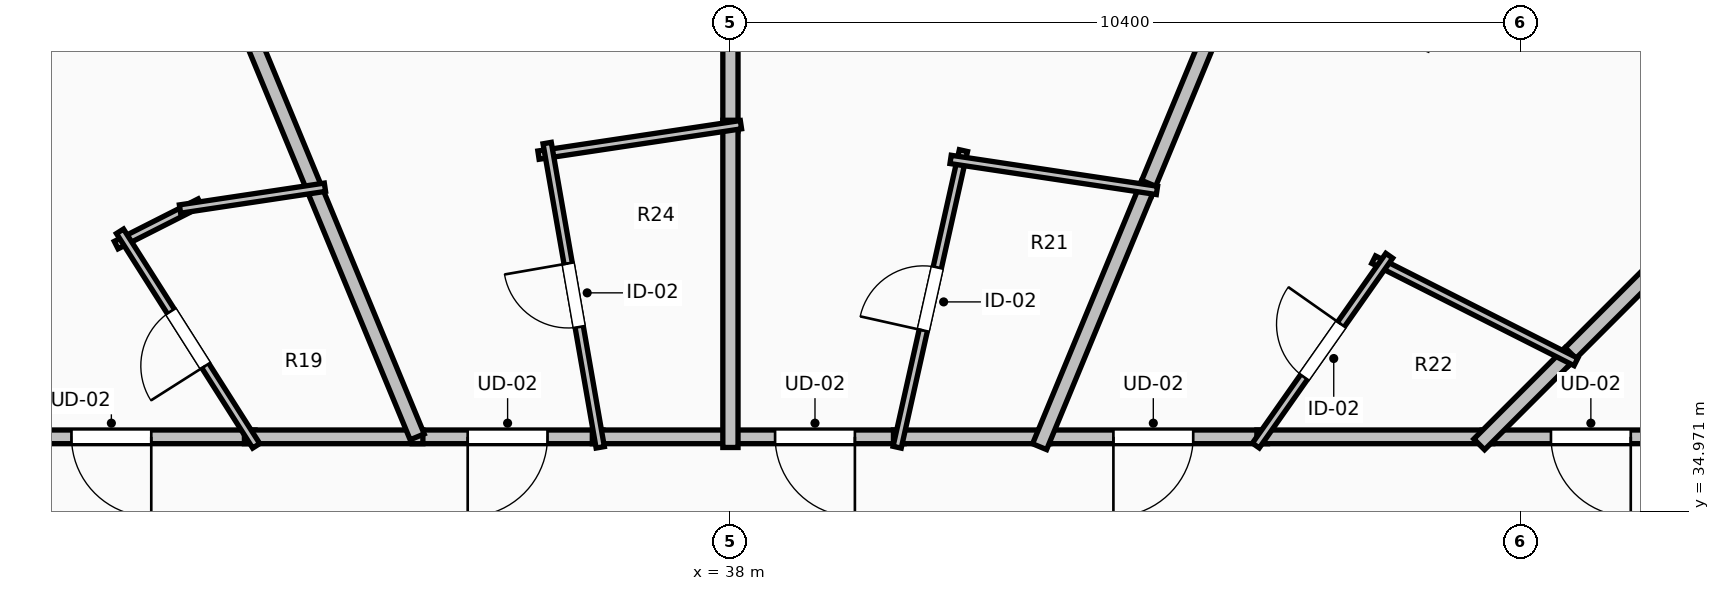
"""IFC4 building model, lengths in metres.
Left out: names, types, materials, properties, quantities, classifications, styles, units other than length and angle.
Written with IfcOpenShell. Run it as: python <this file> out.ifc"""

import sys

from ifc_helpers import new_model, si_unit, direction, frame, frame_2d, origin, place, context, subcontext, project, spatial, rectangle, extrude, element, fill, save


model = new_model("IFC4")
c1 = context("Model", 3, precision=1e-05, world=origin(), true_north=direction((0.0, 1.0)))
c2 = subcontext(c1, "Body", "Model", "MODEL_VIEW")
j1 = project(units=[si_unit("LENGTHUNIT", "METRE"), si_unit("PLANEANGLEUNIT", "RADIAN")], contexts=[c1])
p1 = place(None, origin())
s1 = spatial("IfcSite", under=j1, at=p1, CompositionType="ELEMENT")
p2 = place(p1, origin())
s2 = spatial("IfcBuilding", under=s1, at=p2, CompositionType="ELEMENT")
p3 = place(p2, frame((0.0, 0.0, 27.5)))
s3 = spatial("IfcBuildingStorey", under=s2, at=p3, CompositionType="ELEMENT", Elevation=27.5)
p4 = place(p3, frame((50.75, 35.95, 0.0), z_axis=(0.0, 0.0, 1.0), x_axis=(-1.0, 0.0, 0.0)))
e1 = element("IfcWall", 1, at=p4, inside=s3, PredefinedType="PARTITIONING", context=c2, shape_type="SweptSolid", body=[
    extrude(rectangle(XDim=2.86, YDim=0.18, at=frame_2d((1.43, 0.0))), origin(), (0.0, 0.0, 1.0), 2.432),
])
p5 = place(p4, frame((0.905, 0.0, 0.0)))
e2 = element("IfcOpeningElement", 2, at=p5, cuts=e1, PredefinedType="OPENING", context=c2, shape_type="SweptSolid", body=[
    extrude(rectangle(XDim=1.05, YDim=2.2, at=frame_2d((0.525, 1.1))), frame((0.0, 0.105, 0.0), z_axis=(0.0, -1.0, 0.0), x_axis=(1.0, 0.0, 0.0)), (0.0, 0.0, 1.0), 0.21),
])
p6 = place(p3, frame((45.066, 35.95, 0.0), z_axis=(0.0, 0.0, 1.0), x_axis=(-1.0, 0.0, 0.0)))
e3 = element("IfcWall", 3, at=p6, inside=s3, PredefinedType="PARTITIONING", context=c2, shape_type="SweptSolid", body=[
    extrude(rectangle(XDim=3.005, YDim=0.18, at=frame_2d((1.502, 0.0))), origin(), (0.0, 0.0, 1.0), 3.24),
])
p7 = place(p6, frame((0.978, 0.0, 0.0)))
e4 = element("IfcOpeningElement", 4, at=p7, cuts=e3, PredefinedType="OPENING", context=c2, shape_type="SweptSolid", body=[
    extrude(rectangle(XDim=1.05, YDim=2.2, at=frame_2d((0.525, 1.1))), frame((0.0, 0.105, 0.0), z_axis=(0.0, -1.0, 0.0), x_axis=(1.0, 0.0, 0.0)), (0.0, 0.0, 1.0), 0.21),
])
p8 = place(p3, frame((48.03, 35.95, 0.0), z_axis=(0.0, 0.0, 1.0), x_axis=(-1.0, 0.0, 0.0)))
e5 = element("IfcWall", 5, at=p8, inside=s3, PredefinedType="PARTITIONING", context=c2, shape_type="SweptSolid", body=[
    extrude(rectangle(XDim=3.104, YDim=0.18, at=frame_2d((1.552, 0.0))), origin(), (0.0, 0.0, 1.0), 2.432),
])
p9 = place(p3, frame((40.285, 35.95, 0.0), z_axis=(0.0, 0.0, 1.0), x_axis=(-1.0, 0.0, 0.0)))
e6 = element("IfcWall", 6, at=p9, inside=s3, PredefinedType="PARTITIONING", context=c2, shape_type="SweptSolid", body=[
    extrude(rectangle(XDim=2.345, YDim=0.18, at=frame_2d((1.172, 0.0))), origin(), (0.0, 0.0, 1.0), 3.24),
])
p10 = place(p9, frame((0.647, 0.0, 0.0)))
e7 = element("IfcOpeningElement", 7, at=p10, cuts=e6, PredefinedType="OPENING", context=c2, shape_type="SweptSolid", body=[
    extrude(rectangle(XDim=1.05, YDim=2.2, at=frame_2d((0.525, 1.1))), frame((0.0, 0.105, 0.0), z_axis=(0.0, -1.0, 0.0), x_axis=(1.0, 0.0, 0.0)), (0.0, 0.0, 1.0), 0.21),
])
p11 = place(p3, frame((42.201, 35.95, 0.0), z_axis=(0.0, 0.0, 1.0), x_axis=(-1.0, 0.0, 0.0)))
e8 = element("IfcWall", 8, at=p11, inside=s3, PredefinedType="PARTITIONING", context=c2, shape_type="SweptSolid", body=[
    extrude(rectangle(XDim=2.056, YDim=0.18, at=frame_2d((1.028, 0.0))), origin(), (0.0, 0.0, 1.0), 3.24),
])
p12 = place(p3, frame((36.323, 35.95, 0.0), z_axis=(0.0, 0.0, 1.0), x_axis=(-1.0, 0.0, 0.0)))
e9 = element("IfcWall", 9, at=p12, inside=s3, PredefinedType="PARTITIONING", context=c2, shape_type="SweptSolid", body=[
    extrude(rectangle(XDim=2.509, YDim=0.18, at=frame_2d((1.254, 0.0))), origin(), (0.0, 0.0, 1.0), 3.24),
])
p13 = place(p12, frame((0.729, 0.0, 0.0)))
e10 = element("IfcOpeningElement", 10, at=p13, cuts=e9, PredefinedType="OPENING", context=c2, shape_type="SweptSolid", body=[
    extrude(rectangle(XDim=1.05, YDim=2.2, at=frame_2d((0.525, 1.1))), frame((0.0, 0.105, 0.0), z_axis=(0.0, -1.0, 0.0), x_axis=(1.0, 0.0, 0.0)), (0.0, 0.0, 1.0), 0.21),
])
p14 = place(p3, frame((38.08, 35.95, 0.0), z_axis=(0.0, 0.0, 1.0), x_axis=(-1.0, 0.0, 0.0)))
e11 = element("IfcWall", 11, at=p14, inside=s3, PredefinedType="PARTITIONING", context=c2, shape_type="SweptSolid", body=[
    extrude(rectangle(XDim=1.897, YDim=0.18, at=frame_2d((0.948, 0.0))), origin(), (0.0, 0.0, 1.0), 3.24),
])
p15 = place(p3, frame((31.746, 35.95, 0.0), z_axis=(0.0, 0.0, 1.0), x_axis=(-1.0, 0.0, 0.0)))
e12 = element("IfcWall", 12, at=p15, inside=s3, PredefinedType="PARTITIONING", context=c2, shape_type="SweptSolid", body=[
    extrude(rectangle(XDim=3.781, YDim=0.18, at=frame_2d((1.891, 0.0))), origin(), (0.0, 0.0, 1.0), 2.432),
])
p16 = place(p15, frame((1.365, 0.0, 0.0)))
e13 = element("IfcOpeningElement", 13, at=p16, cuts=e12, PredefinedType="OPENING", context=c2, shape_type="SweptSolid", body=[
    extrude(rectangle(XDim=1.05, YDim=2.2, at=frame_2d((0.525, 1.1))), frame((0.0, 0.105, 0.0), z_axis=(0.0, -1.0, 0.0), x_axis=(1.0, 0.0, 0.0)), (0.0, 0.0, 1.0), 0.21),
])
p17 = place(p3, frame((33.954, 35.95, 0.0), z_axis=(0.0, 0.0, 1.0), x_axis=(-1.0, 0.0, 0.0)))
e14 = element("IfcWall", 14, at=p17, inside=s3, PredefinedType="PARTITIONING", context=c2, shape_type="SweptSolid", body=[
    extrude(rectangle(XDim=2.348, YDim=0.18, at=frame_2d((1.174, 0.0))), origin(), (0.0, 0.0, 1.0), 3.24),
])
p18 = place(p3, frame((55.753, 43.753, 0.0), z_axis=(0.0, 0.0, 1.0), x_axis=(-0.707106781187, -0.707106781187, 0.0)))
e15 = element("IfcWall", 15, at=p18, inside=s3, PredefinedType="PARTITIONING", context=c2, shape_type="SweptSolid", body=[
    extrude(rectangle(XDim=9.615, YDim=0.2, at=frame_2d((4.808, 0.0))), origin(), (0.0, 0.0, 1.0), 2.624),
])
p19 = place(p3, frame((49.053, 37.053, 0.0), z_axis=(0.0, 0.0, 1.0), x_axis=(-0.707106781187, -0.707106781187, 0.0)))
e16 = element("IfcWall", 16, at=p19, inside=s3, PredefinedType="PARTITIONING", context=c2, shape_type="SweptSolid", body=[
    extrude(rectangle(XDim=1.7, YDim=0.2, at=frame_2d((0.85, 0.0))), origin(), (0.0, 0.0, 1.0), 2.432),
])
p20 = place(p3, frame((46.462, 38.281, 0.0), z_axis=(0.0, 0.0, 1.0), x_axis=(0.892486842203, -0.451073426944, 0.0)))
e17 = element("IfcWall", 17, at=p20, inside=s3, PredefinedType="PARTITIONING", context=c2, shape_type="SweptSolid", body=[
    extrude(rectangle(XDim=2.982, YDim=0.11, at=frame_2d((1.491, 0.0))), origin(), (0.0, 0.0, 1.0), 2.432),
])
p21 = place(p3, frame((44.913, 35.835, 0.0), z_axis=(0.0, 0.0, 1.0), x_axis=(0.574986040322, 0.818163219312, 0.0)))
e18 = element("IfcWall", 18, at=p21, inside=s3, PredefinedType="PARTITIONING", context=c2, shape_type="SweptSolid", body=[
    extrude(rectangle(XDim=3.052, YDim=0.11, at=frame_2d((1.526, 0.0))), origin(), (0.0, 0.0, 1.0), 2.922),
])
p22 = place(p21, frame((1.101, 0.0, 0.0)))
e19 = element("IfcOpeningElement", 19, at=p22, cuts=e18, PredefinedType="OPENING", context=c2, shape_type="SweptSolid", body=[
    extrude(rectangle(XDim=0.85, YDim=2.1, at=frame_2d((0.425, 1.05))), frame((0.0, 0.07, 0.0), z_axis=(0.0, -1.0, 0.0), x_axis=(1.0, 0.0, 0.0)), (0.0, 0.0, 1.0), 0.14),
])
p23 = place(p3, frame((46.792, 47.225, 0.0), z_axis=(0.0, 0.0, 1.0), x_axis=(-0.382750893248, -0.923851586413, 0.0)))
e20 = element("IfcWall", 20, at=p23, inside=s3, PredefinedType="PARTITIONING", context=c2, shape_type="SweptSolid", body=[
    extrude(rectangle(XDim=8.734, YDim=0.2, at=frame_2d((4.367, 0.0))), origin(), (0.0, 0.0, 1.0), 2.874),
])
p24 = place(p3, frame((43.503, 39.285, 0.0), z_axis=(0.0, 0.0, 1.0), x_axis=(-0.382867331148, -0.923803337697, 0.0)))
e21 = element("IfcWall", 21, at=p24, inside=s3, PredefinedType="PARTITIONING", context=c2, shape_type="SweptSolid", body=[
    extrude(rectangle(XDim=3.75, YDim=0.2, at=frame_2d((1.875, 0.0))), origin(), (0.0, 0.0, 1.0), 2.922),
])
p25 = place(p3, frame((40.194, 35.813, 0.0), z_axis=(0.0, 0.0, 1.0), x_axis=(0.21804880916, 0.975937865248, 0.0)))
e22 = element("IfcWall", 22, at=p25, inside=s3, PredefinedType="PARTITIONING", context=c2, shape_type="SweptSolid", body=[
    extrude(rectangle(XDim=3.998, YDim=0.11, at=frame_2d((1.999, 0.0))), origin(), (0.0, 0.0, 1.0), 2.922),
])
p26 = place(p25, frame((1.574, 0.0, 0.0)))
e23 = element("IfcOpeningElement", 23, at=p26, cuts=e22, PredefinedType="OPENING", context=c2, shape_type="SweptSolid", body=[
    extrude(rectangle(XDim=0.85, YDim=2.1, at=frame_2d((0.425, 1.05))), frame((0.0, 0.07, 0.0), z_axis=(0.0, -1.0, 0.0), x_axis=(1.0, 0.0, 0.0)), (0.0, 0.0, 1.0), 0.14),
])
p27 = place(p3, frame((40.896, 39.6, 0.0), z_axis=(0.0, 0.0, 1.0), x_axis=(0.98891024541, -0.148514398367, 0.0)))
e24 = element("IfcWall", 24, at=p27, inside=s3, PredefinedType="PARTITIONING", context=c2, shape_type="SweptSolid", body=[
    extrude(rectangle(XDim=2.745, YDim=0.11, at=frame_2d((1.373, 0.0))), origin(), (0.0, 0.0, 1.0), 3.24),
])
p28 = place(p3, frame((38.0, 48.35, 0.0), z_axis=(0.0, 0.0, 1.0), x_axis=(0.0, -1.0, 0.0)))
e25 = element("IfcWall", 25, at=p28, inside=s3, PredefinedType="PARTITIONING", context=c2, shape_type="SweptSolid", body=[
    extrude(rectangle(XDim=8.375, YDim=0.2, at=frame_2d((4.188, 0.0))), origin(), (0.0, 0.0, 1.0), 2.432),
])
p29 = place(p3, frame((38.0, 40.115, 0.0), z_axis=(0.0, 0.0, 1.0), x_axis=(0.0, -1.0, 0.0)))
e26 = element("IfcWall", 26, at=p29, inside=s3, PredefinedType="PARTITIONING", context=c2, shape_type="SweptSolid", body=[
    extrude(rectangle(XDim=4.305, YDim=0.2, at=frame_2d((2.152, 0.0))), origin(), (0.0, 0.0, 1.0), 2.922),
])
p30 = place(p3, frame((35.475, 39.656, 0.0), z_axis=(0.0, 0.0, 1.0), x_axis=(0.988878442063, 0.148726012595, 0.0)))
e27 = element("IfcWall", 27, at=p30, inside=s3, PredefinedType="PARTITIONING", context=c2, shape_type="SweptSolid", body=[
    extrude(rectangle(XDim=2.694, YDim=0.11, at=frame_2d((1.347, 0.0))), origin(), (0.0, 0.0, 1.0), 3.24),
])
p31 = place(p3, frame((36.287, 35.812, 0.0), z_axis=(0.0, 0.0, 1.0), x_axis=(-0.171838135253, 0.985125197766, 0.0)))
e28 = element("IfcWall", 28, at=p31, inside=s3, PredefinedType="PARTITIONING", context=c2, shape_type="SweptSolid", body=[
    extrude(rectangle(XDim=4.063, YDim=0.11, at=frame_2d((2.032, 0.0))), origin(), (0.0, 0.0, 1.0), 2.922),
])
p32 = place(p31, frame((1.607, 0.0, 0.0)))
e29 = element("IfcOpeningElement", 29, at=p32, cuts=e28, PredefinedType="OPENING", context=c2, shape_type="SweptSolid", body=[
    extrude(rectangle(XDim=0.85, YDim=2.1, at=frame_2d((0.425, 1.05))), frame((0.0, 0.07, 0.0), z_axis=(0.0, -1.0, 0.0), x_axis=(1.0, 0.0, 0.0)), (0.0, 0.0, 1.0), 0.14),
])
p33 = place(p3, frame((29.208, 47.225, 0.0), z_axis=(0.0, 0.0, 1.0), x_axis=(0.382723985517, -0.923862733803, 0.0)))
e30 = element("IfcWall", 30, at=p33, inside=s3, PredefinedType="PARTITIONING", context=c2, shape_type="SweptSolid", body=[
    extrude(rectangle(XDim=12.204, YDim=0.2, at=frame_2d((6.102, 0.0))), origin(), (0.0, 0.0, 1.0), 2.432),
])
p34 = place(p3, frame((29.919, 38.473, 0.0), z_axis=(0.0, 0.0, 1.0), x_axis=(0.892084606746, 0.45186840386, 0.0)))
e31 = element("IfcWall", 31, at=p34, inside=s3, PredefinedType="PARTITIONING", context=c2, shape_type="SweptSolid", body=[
    extrude(rectangle(XDim=1.236, YDim=0.11, at=frame_2d((0.618, 0.0))), origin(), (0.0, 0.0, 1.0), 3.24),
])
p35 = place(p3, frame((30.759, 38.947, 0.0), z_axis=(0.0, 0.0, 1.0), x_axis=(0.988889867338, 0.148650026153, 0.0)))
e32 = element("IfcWall", 32, at=p35, inside=s3, PredefinedType="PARTITIONING", context=c2, shape_type="SweptSolid", body=[
    extrude(rectangle(XDim=1.928, YDim=0.11, at=frame_2d((0.964, 0.0))), origin(), (0.0, 0.0, 1.0), 3.24),
])
p36 = place(p3, frame((31.761, 35.832, 0.0), z_axis=(0.0, 0.0, 1.0), x_axis=(-0.535991614842, 0.844223305067, 0.0)))
e33 = element("IfcWall", 33, at=p36, inside=s3, PredefinedType="PARTITIONING", context=c2, shape_type="SweptSolid", body=[
    extrude(rectangle(XDim=3.343, YDim=0.11, at=frame_2d((1.672, 0.0))), origin(), (0.0, 0.0, 1.0), 2.432),
])
p37 = place(p36, frame((1.247, 0.0, 0.0)))
e34 = element("IfcOpeningElement", 34, at=p37, cuts=e33, PredefinedType="OPENING", context=c2, shape_type="SweptSolid", body=[
    extrude(rectangle(XDim=0.85, YDim=2.1, at=frame_2d((0.425, 1.05))), frame((0.0, 0.07, 0.0), z_axis=(0.0, -1.0, 0.0), x_axis=(1.0, 0.0, 0.0)), (0.0, 0.0, 1.0), 0.14),
])
p38 = place(p5, origin())
e35 = element("IfcDoor", 35, at=p38, inside=s3, OperationType="SINGLE_SWING_LEFT", PredefinedType="DOOR", context=c2, shape_type="SweptSolid", body=[
    extrude(rectangle(XDim=1.05, YDim=2.2, at=frame_2d((0.525, 1.1))), frame((0.0, 0.025, 0.0), z_axis=(0.0, -1.0, 0.0), x_axis=(1.0, 0.0, 0.0)), (0.0, 0.0, 1.0), 0.05),
])
fill(e2, e35)
p39 = place(p7, origin())
e36 = element("IfcDoor", 36, at=p39, inside=s3, OperationType="SINGLE_SWING_RIGHT", PredefinedType="DOOR", context=c2, shape_type="SweptSolid", body=[
    extrude(rectangle(XDim=1.05, YDim=2.2, at=frame_2d((0.525, 1.1))), frame((0.0, 0.025, 0.0), z_axis=(0.0, -1.0, 0.0), x_axis=(1.0, 0.0, 0.0)), (0.0, 0.0, 1.0), 0.05),
])
fill(e4, e36)
p40 = place(p10, origin())
e37 = element("IfcDoor", 37, at=p40, inside=s3, OperationType="SINGLE_SWING_LEFT", PredefinedType="DOOR", context=c2, shape_type="SweptSolid", body=[
    extrude(rectangle(XDim=1.05, YDim=2.2, at=frame_2d((0.525, 1.1))), frame((0.0, 0.025, 0.0), z_axis=(0.0, -1.0, 0.0), x_axis=(1.0, 0.0, 0.0)), (0.0, 0.0, 1.0), 0.05),
])
fill(e7, e37)
p41 = place(p13, origin())
e38 = element("IfcDoor", 38, at=p41, inside=s3, OperationType="SINGLE_SWING_RIGHT", PredefinedType="DOOR", context=c2, shape_type="SweptSolid", body=[
    extrude(rectangle(XDim=1.05, YDim=2.2, at=frame_2d((0.525, 1.1))), frame((0.0, 0.025, 0.0), z_axis=(0.0, -1.0, 0.0), x_axis=(1.0, 0.0, 0.0)), (0.0, 0.0, 1.0), 0.05),
])
fill(e10, e38)
p42 = place(p16, origin())
e39 = element("IfcDoor", 39, at=p42, inside=s3, OperationType="SINGLE_SWING_LEFT", PredefinedType="DOOR", context=c2, shape_type="SweptSolid", body=[
    extrude(rectangle(XDim=1.05, YDim=2.2, at=frame_2d((0.525, 1.1))), frame((0.0, 0.025, 0.0), z_axis=(0.0, -1.0, 0.0), x_axis=(1.0, 0.0, 0.0)), (0.0, 0.0, 1.0), 0.05),
])
fill(e13, e39)
p43 = place(p22, origin())
e40 = element("IfcDoor", 40, at=p43, inside=s3, OperationType="SINGLE_SWING_RIGHT", PredefinedType="DOOR", context=c2, shape_type="SweptSolid", body=[
    extrude(rectangle(XDim=0.85, YDim=2.1, at=frame_2d((0.425, 1.05))), frame((0.0, 0.025, 0.0), z_axis=(0.0, -1.0, 0.0), x_axis=(1.0, 0.0, 0.0)), (0.0, 0.0, 1.0), 0.05),
])
fill(e19, e40)
p44 = place(p26, origin())
e41 = element("IfcDoor", 41, at=p44, inside=s3, OperationType="SINGLE_SWING_LEFT", PredefinedType="DOOR", context=c2, shape_type="SweptSolid", body=[
    extrude(rectangle(XDim=0.85, YDim=2.1, at=frame_2d((0.425, 1.05))), frame((0.0, 0.025, 0.0), z_axis=(0.0, -1.0, 0.0), x_axis=(1.0, 0.0, 0.0)), (0.0, 0.0, 1.0), 0.05),
])
fill(e23, e41)
p45 = place(p32, origin())
e42 = element("IfcDoor", 42, at=p45, inside=s3, OperationType="SINGLE_SWING_RIGHT", PredefinedType="DOOR", context=c2, shape_type="SweptSolid", body=[
    extrude(rectangle(XDim=0.85, YDim=2.1, at=frame_2d((0.425, 1.05))), frame((0.0, 0.025, 0.0), z_axis=(0.0, -1.0, 0.0), x_axis=(1.0, 0.0, 0.0)), (0.0, 0.0, 1.0), 0.05),
])
fill(e29, e42)
p46 = place(p37, origin())
e43 = element("IfcDoor", 43, at=p46, inside=s3, OperationType="SINGLE_SWING_LEFT", PredefinedType="DOOR", context=c2, shape_type="SweptSolid", body=[
    extrude(rectangle(XDim=0.85, YDim=2.1, at=frame_2d((0.425, 1.05))), frame((0.0, 0.025, 0.0), z_axis=(0.0, -1.0, 0.0), x_axis=(1.0, 0.0, 0.0)), (0.0, 0.0, 1.0), 0.05),
])
fill(e34, e43)
save(model, sys.argv[1])
